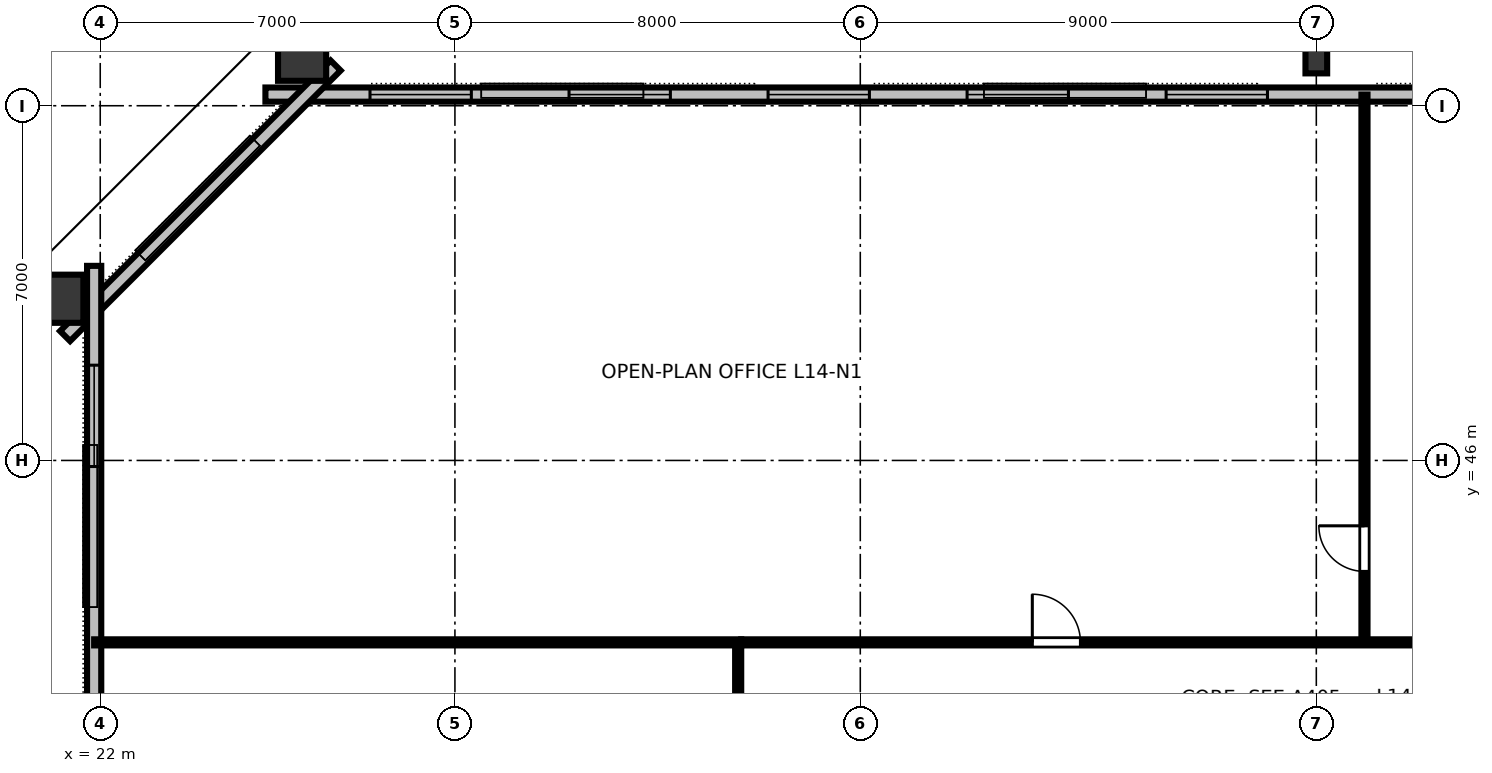
"""IFC4 building model, lengths in metres.
Left out: names, types, materials, properties, quantities, classifications, styles, units other than length and angle.
Written with IfcOpenShell. Run it as: python <this file> out.ifc"""

import sys

from ifc_helpers import new_model, si_unit, direction, frame, frame_2d, origin, origin_2d, place, context, subcontext, project, spatial, rectangle, hollow_rectangle, i_section, extrude, element, fill, save


model = new_model("IFC4")
c1 = context("Model", 3, precision=1e-05, world=origin(), true_north=direction((0.0, 1.0)))
c2 = subcontext(c1, "Body", "Model", "MODEL_VIEW")
j1 = project(units=[si_unit("LENGTHUNIT", "METRE"), si_unit("PLANEANGLEUNIT", "RADIAN")], contexts=[c1])
p1 = place(None, origin())
s1 = spatial("IfcSite", under=j1, at=p1, CompositionType="ELEMENT")
p2 = place(p1, origin())
s2 = spatial("IfcBuilding", under=s1, at=p2, CompositionType="ELEMENT")
p3 = place(p2, frame((0.0, 0.0, 56.8)))
s3 = spatial("IfcBuildingStorey", under=s2, at=p3, CompositionType="ELEMENT", Elevation=56.8)
p4 = place(p3, frame((46.0, 53.88, 0.0), z_axis=(0.0, 0.089001216718, 0.996031517284), x_axis=(-1.0, 0.0, 0.0)))
e1 = element("IfcColumn", 1, at=p4, inside=s3, PredefinedType="COLUMN", context=c2, shape_type="SweptSolid", body=[
    extrude(i_section(OverallWidth=0.428, OverallDepth=0.483, WebThickness=0.051, FlangeThickness=0.082, FilletRadius=0.025, at=origin_2d()), origin(), (0.0, 0.0, 1.0), 3.371),
])
p5 = place(p3, frame((25.984, 54.067, 0.0), z_axis=(-0.04485544424, 0.088480981137, 0.995067387215), x_axis=(-0.891933822614, -0.452165960769, 0.0)))
e2 = element("IfcColumn", 2, at=p5, inside=s3, PredefinedType="COLUMN", context=c2, shape_type="SweptSolid", body=[
    extrude(hollow_rectangle(XDim=0.95, YDim=1.15, WallThickness=0.06, at=origin_2d()), origin(), (0.0, 0.0, 1.0), 3.375),
])
p6 = place(p3, frame((21.093, 49.191, 0.0), z_axis=(-0.103150348316, 0.030287313206, 0.994204548522), x_axis=(0.953933183148, -0.280096708997, 0.107504956625)))
e3 = element("IfcColumn", 3, at=p6, inside=s3, PredefinedType="COLUMN", context=c2, shape_type="SweptSolid", body=[
    extrude(hollow_rectangle(XDim=0.95, YDim=1.15, WallThickness=0.06, at=origin_2d()), origin(), (0.0, 0.0, 1.0), 3.377),
])
p7 = place(p3, frame((66.74, 53.22, 0.0), z_axis=(0.0, 0.0, 1.0), x_axis=(-1.0, 0.0, 0.0)))
e4 = element("IfcWall", 4, at=p7, inside=s3, PredefinedType="STANDARD", context=c2, shape_type="SweptSolid", body=[
    extrude(rectangle(XDim=41.48, YDim=0.28, at=frame_2d((20.74, 0.0))), origin(), (0.0, 0.0, 1.0), 3.36),
])
p8 = place(p7, frame((2.064, 0.0, 0.8)))
e5 = element("IfcOpeningElement", 5, at=p8, cuts=e4, PredefinedType="OPENING", context=c2, shape_type="SweptSolid", body=[
    extrude(rectangle(XDim=2.0, YDim=1.95, at=frame_2d((1.0, 0.975))), frame((0.0, 0.15, 0.0), z_axis=(0.0, -1.0, 0.0), x_axis=(1.0, 0.0, 0.0)), (0.0, 0.0, 1.0), 0.3),
])
p9 = place(p7, frame((5.992, 0.0, 0.8)))
e6 = element("IfcOpeningElement", 6, at=p9, cuts=e4, PredefinedType="OPENING", context=c2, shape_type="SweptSolid", body=[
    extrude(rectangle(XDim=2.0, YDim=1.95, at=frame_2d((1.0, 0.975))), frame((0.0, 0.15, 0.0), z_axis=(0.0, -1.0, 0.0), x_axis=(1.0, 0.0, 0.0)), (0.0, 0.0, 1.0), 0.3),
])
p10 = place(p7, frame((9.92, 0.0, 0.8)))
e7 = element("IfcOpeningElement", 7, at=p10, cuts=e4, PredefinedType="OPENING", context=c2, shape_type="SweptSolid", body=[
    extrude(rectangle(XDim=2.0, YDim=1.95, at=frame_2d((1.0, 0.975))), frame((0.0, 0.15, 0.0), z_axis=(0.0, -1.0, 0.0), x_axis=(1.0, 0.0, 0.0)), (0.0, 0.0, 1.0), 0.3),
])
p11 = place(p7, frame((13.848, 0.0, 0.8)))
e8 = element("IfcOpeningElement", 8, at=p11, cuts=e4, PredefinedType="OPENING", context=c2, shape_type="SweptSolid", body=[
    extrude(rectangle(XDim=2.0, YDim=1.95, at=frame_2d((1.0, 0.975))), frame((0.0, 0.15, 0.0), z_axis=(0.0, -1.0, 0.0), x_axis=(1.0, 0.0, 0.0)), (0.0, 0.0, 1.0), 0.3),
])
p12 = place(p7, frame((21.704, 0.0, 0.8)))
e9 = element("IfcOpeningElement", 9, at=p12, cuts=e4, PredefinedType="OPENING", context=c2, shape_type="SweptSolid", body=[
    extrude(rectangle(XDim=2.0, YDim=1.95, at=frame_2d((1.0, 0.975))), frame((0.0, 0.15, 0.0), z_axis=(0.0, -1.0, 0.0), x_axis=(1.0, 0.0, 0.0)), (0.0, 0.0, 1.0), 0.3),
])
p13 = place(p7, frame((25.632, 0.0, 0.8)))
e10 = element("IfcOpeningElement", 10, at=p13, cuts=e4, PredefinedType="OPENING", context=c2, shape_type="SweptSolid", body=[
    extrude(rectangle(XDim=2.0, YDim=1.95, at=frame_2d((1.0, 0.975))), frame((0.0, 0.15, 0.0), z_axis=(0.0, -1.0, 0.0), x_axis=(1.0, 0.0, 0.0)), (0.0, 0.0, 1.0), 0.3),
])
p14 = place(p7, frame((29.56, 0.0, 0.8)))
e11 = element("IfcOpeningElement", 11, at=p14, cuts=e4, PredefinedType="OPENING", context=c2, shape_type="SweptSolid", body=[
    extrude(rectangle(XDim=2.0, YDim=1.95, at=frame_2d((1.0, 0.975))), frame((0.0, 0.15, 0.0), z_axis=(0.0, -1.0, 0.0), x_axis=(1.0, 0.0, 0.0)), (0.0, 0.0, 1.0), 0.3),
])
p15 = place(p7, frame((33.488, 0.0, 0.8)))
e12 = element("IfcOpeningElement", 12, at=p15, cuts=e4, PredefinedType="OPENING", context=c2, shape_type="SweptSolid", body=[
    extrude(rectangle(XDim=2.0, YDim=1.95, at=frame_2d((1.0, 0.975))), frame((0.0, 0.15, 0.0), z_axis=(0.0, -1.0, 0.0), x_axis=(1.0, 0.0, 0.0)), (0.0, 0.0, 1.0), 0.3),
])
p16 = place(p7, frame((37.416, 0.0, 0.8)))
e13 = element("IfcOpeningElement", 13, at=p16, cuts=e4, PredefinedType="OPENING", context=c2, shape_type="SweptSolid", body=[
    extrude(rectangle(XDim=2.0, YDim=1.95, at=frame_2d((1.0, 0.975))), frame((0.0, 0.15, 0.0), z_axis=(0.0, -1.0, 0.0), x_axis=(1.0, 0.0, 0.0)), (0.0, 0.0, 1.0), 0.3),
])
p17 = place(p3, frame((26.646, 53.794, 0.0), z_axis=(0.0, 0.0, 1.0), x_axis=(-0.707106781187, -0.707106781187, 0.0)))
e14 = element("IfcWall", 14, at=p17, inside=s3, PredefinedType="STANDARD", context=c2, shape_type="SweptSolid", body=[
    extrude(rectangle(XDim=7.551, YDim=0.28, at=frame_2d((3.775, 0.0))), origin(), (0.0, 0.0, 1.0), 3.36),
])
p18 = place(p3, frame((21.88, 49.84, 0.0), z_axis=(0.0, 0.0, 1.0), x_axis=(0.0, -1.0, 0.0)))
e15 = element("IfcWall", 15, at=p18, inside=s3, PredefinedType="STANDARD", context=c2, shape_type="SweptSolid", body=[
    extrude(rectangle(XDim=35.68, YDim=0.28, at=frame_2d((17.84, 0.0))), origin(), (0.0, 0.0, 1.0), 3.36),
])
p19 = place(p18, frame((1.96, 0.0, 0.8)))
e16 = element("IfcOpeningElement", 16, at=p19, cuts=e15, PredefinedType="OPENING", context=c2, shape_type="SweptSolid", body=[
    extrude(rectangle(XDim=2.0, YDim=1.95, at=frame_2d((1.0, 0.975))), frame((0.0, 0.15, 0.0), z_axis=(0.0, -1.0, 0.0), x_axis=(1.0, 0.0, 0.0)), (0.0, 0.0, 1.0), 0.3),
])
p20 = place(p18, frame((9.4, 0.0, 0.8)))
e17 = element("IfcOpeningElement", 17, at=p20, cuts=e15, PredefinedType="OPENING", context=c2, shape_type="SweptSolid", body=[
    extrude(rectangle(XDim=2.0, YDim=1.95, at=frame_2d((1.0, 0.975))), frame((0.0, 0.15, 0.0), z_axis=(0.0, -1.0, 0.0), x_axis=(1.0, 0.0, 0.0)), (0.0, 0.0, 1.0), 0.3),
])
p21 = place(p18, frame((13.12, 0.0, 0.8)))
e18 = element("IfcOpeningElement", 18, at=p21, cuts=e15, PredefinedType="OPENING", context=c2, shape_type="SweptSolid", body=[
    extrude(rectangle(XDim=2.0, YDim=1.95, at=frame_2d((1.0, 0.975))), frame((0.0, 0.15, 0.0), z_axis=(0.0, -1.0, 0.0), x_axis=(1.0, 0.0, 0.0)), (0.0, 0.0, 1.0), 0.3),
])
p22 = place(p18, frame((20.56, 0.0, 0.8)))
e19 = element("IfcOpeningElement", 19, at=p22, cuts=e15, PredefinedType="OPENING", context=c2, shape_type="SweptSolid", body=[
    extrude(rectangle(XDim=2.0, YDim=1.95, at=frame_2d((1.0, 0.975))), frame((0.0, 0.15, 0.0), z_axis=(0.0, -1.0, 0.0), x_axis=(1.0, 0.0, 0.0)), (0.0, 0.0, 1.0), 0.3),
])
p23 = place(p18, frame((24.28, 0.0, 0.8)))
e20 = element("IfcOpeningElement", 20, at=p23, cuts=e15, PredefinedType="OPENING", context=c2, shape_type="SweptSolid", body=[
    extrude(rectangle(XDim=2.0, YDim=1.95, at=frame_2d((1.0, 0.975))), frame((0.0, 0.15, 0.0), z_axis=(0.0, -1.0, 0.0), x_axis=(1.0, 0.0, 0.0)), (0.0, 0.0, 1.0), 0.3),
])
p24 = place(p18, frame((31.72, 0.0, 0.8)))
e21 = element("IfcOpeningElement", 21, at=p24, cuts=e15, PredefinedType="OPENING", context=c2, shape_type="SweptSolid", body=[
    extrude(rectangle(XDim=2.0, YDim=1.95, at=frame_2d((1.0, 0.975))), frame((0.0, 0.15, 0.0), z_axis=(0.0, -1.0, 0.0), x_axis=(1.0, 0.0, 0.0)), (0.0, 0.0, 1.0), 0.3),
])
p25 = place(p3, frame((46.95, 42.41, 0.0), z_axis=(0.0, 0.0, 1.0), x_axis=(0.0, 1.0, 0.0)))
e22 = element("IfcWall", 22, at=p25, inside=s3, PredefinedType="PARTITIONING", context=c2, shape_type="SweptSolid", body=[
    extrude(rectangle(XDim=10.81, YDim=0.12, at=frame_2d((5.405, 0.0))), origin(), (0.0, 0.0, 1.0), 2.64),
])
p26 = place(p25, frame((1.4, 0.0, 0.0)))
e23 = element("IfcOpeningElement", 23, at=p26, cuts=e22, PredefinedType="OPENING", context=c2, shape_type="SweptSolid", body=[
    extrude(rectangle(XDim=0.9, YDim=2.15, at=frame_2d((0.45, 1.075))), frame((0.0, 0.07, 0.0), z_axis=(0.0, -1.0, 0.0), x_axis=(1.0, 0.0, 0.0)), (0.0, 0.0, 1.0), 0.14),
])
p27 = place(p3, frame((34.65, 42.41, 0.0), z_axis=(0.0, 0.0, 1.0), x_axis=(1.0, 0.0, 0.0)))
e24 = element("IfcWall", 24, at=p27, inside=s3, PredefinedType="PARTITIONING", context=c2, shape_type="SweptSolid", body=[
    extrude(rectangle(XDim=22.7, YDim=0.12, at=frame_2d((11.35, 0.0))), origin(), (0.0, 0.0, 1.0), 2.64),
])
p28 = place(p27, frame((5.745, 0.0, 0.0)))
e25 = element("IfcOpeningElement", 25, at=p28, cuts=e24, PredefinedType="OPENING", context=c2, shape_type="SweptSolid", body=[
    extrude(rectangle(XDim=0.95, YDim=2.15, at=frame_2d((0.475, 1.075))), frame((0.0, 0.07, 0.0), z_axis=(0.0, -1.0, 0.0), x_axis=(1.0, 0.0, 0.0)), (0.0, 0.0, 1.0), 0.14),
])
p29 = place(p27, frame((16.955, 0.0, 0.0)))
e26 = element("IfcOpeningElement", 26, at=p29, cuts=e24, PredefinedType="OPENING", context=c2, shape_type="SweptSolid", body=[
    extrude(rectangle(XDim=0.95, YDim=2.15, at=frame_2d((0.475, 1.075))), frame((0.0, 0.07, 0.0), z_axis=(0.0, -1.0, 0.0), x_axis=(1.0, 0.0, 0.0)), (0.0, 0.0, 1.0), 0.14),
])
p30 = place(p3, frame((34.59, 21.65, 0.0), z_axis=(0.0, 0.0, 1.0), x_axis=(0.0, 1.0, 0.0)))
e27 = element("IfcWall", 27, at=p30, inside=s3, PredefinedType="PARTITIONING", context=c2, shape_type="SweptSolid", body=[
    extrude(rectangle(XDim=20.7, YDim=0.12, at=frame_2d((10.35, 0.0))), origin(), (0.0, 0.0, 1.0), 2.64),
])
p31 = place(p30, frame((9.875, 0.0, 0.0)))
e28 = element("IfcOpeningElement", 28, at=p31, cuts=e27, PredefinedType="OPENING", context=c2, shape_type="SweptSolid", body=[
    extrude(rectangle(XDim=0.95, YDim=2.15, at=frame_2d((0.475, 1.075))), frame((0.0, 0.07, 0.0), z_axis=(0.0, -1.0, 0.0), x_axis=(1.0, 0.0, 0.0)), (0.0, 0.0, 1.0), 0.14),
])
p32 = place(p3, frame((34.65, 42.41, 0.0), z_axis=(0.0, 0.0, 1.0), x_axis=(-1.0, 0.0, 0.0)))
e29 = element("IfcWall", 29, at=p32, inside=s3, PredefinedType="PARTITIONING", context=c2, shape_type="SweptSolid", body=[
    extrude(rectangle(XDim=12.77, YDim=0.12, at=frame_2d((6.385, 0.0))), origin(), (0.0, 0.0, 1.0), 2.64),
])
p33 = place(p12, origin())
e30 = element("IfcWindow", 30, at=p33, inside=s3, PartitioningType="SINGLE_PANEL", PredefinedType="WINDOW", context=c2, shape_type="SweptSolid", body=[
    extrude(rectangle(XDim=2.0, YDim=1.95, at=frame_2d((1.0, 0.975))), frame((0.0, 0.03, 0.0), z_axis=(0.0, -1.0, 0.0), x_axis=(1.0, 0.0, 0.0)), (0.0, 0.0, 1.0), 0.06),
])
fill(e9, e30)
p34 = place(p13, origin())
e31 = element("IfcWindow", 31, at=p34, inside=s3, PartitioningType="SINGLE_PANEL", PredefinedType="WINDOW", context=c2, shape_type="SweptSolid", body=[
    extrude(rectangle(XDim=2.0, YDim=1.95, at=frame_2d((1.0, 0.975))), frame((0.0, 0.03, 0.0), z_axis=(0.0, -1.0, 0.0), x_axis=(1.0, 0.0, 0.0)), (0.0, 0.0, 1.0), 0.06),
])
fill(e10, e31)
p35 = place(p14, origin())
e32 = element("IfcWindow", 32, at=p35, inside=s3, PartitioningType="SINGLE_PANEL", PredefinedType="WINDOW", context=c2, shape_type="SweptSolid", body=[
    extrude(rectangle(XDim=2.0, YDim=1.95, at=frame_2d((1.0, 0.975))), frame((0.0, 0.03, 0.0), z_axis=(0.0, -1.0, 0.0), x_axis=(1.0, 0.0, 0.0)), (0.0, 0.0, 1.0), 0.06),
])
fill(e11, e32)
p36 = place(p15, origin())
e33 = element("IfcWindow", 33, at=p36, inside=s3, PartitioningType="SINGLE_PANEL", PredefinedType="WINDOW", context=c2, shape_type="SweptSolid", body=[
    extrude(rectangle(XDim=2.0, YDim=1.95, at=frame_2d((1.0, 0.975))), frame((0.0, 0.03, 0.0), z_axis=(0.0, -1.0, 0.0), x_axis=(1.0, 0.0, 0.0)), (0.0, 0.0, 1.0), 0.06),
])
fill(e12, e33)
p37 = place(p16, origin())
e34 = element("IfcWindow", 34, at=p37, inside=s3, PartitioningType="SINGLE_PANEL", PredefinedType="WINDOW", context=c2, shape_type="SweptSolid", body=[
    extrude(rectangle(XDim=2.0, YDim=1.95, at=frame_2d((1.0, 0.975))), frame((0.0, 0.03, 0.0), z_axis=(0.0, -1.0, 0.0), x_axis=(1.0, 0.0, 0.0)), (0.0, 0.0, 1.0), 0.06),
])
fill(e13, e34)
p38 = place(p19, origin())
e35 = element("IfcWindow", 35, at=p38, inside=s3, PartitioningType="SINGLE_PANEL", PredefinedType="WINDOW", context=c2, shape_type="SweptSolid", body=[
    extrude(rectangle(XDim=2.0, YDim=1.95, at=frame_2d((1.0, 0.975))), frame((0.0, 0.03, 0.0), z_axis=(0.0, -1.0, 0.0), x_axis=(1.0, 0.0, 0.0)), (0.0, 0.0, 1.0), 0.06),
])
fill(e16, e35)
p39 = place(p26, origin())
e36 = element("IfcDoor", 36, at=p39, inside=s3, OperationType="SINGLE_SWING_RIGHT", PredefinedType="DOOR", context=c2, shape_type="SweptSolid", body=[
    extrude(rectangle(XDim=0.9, YDim=2.15, at=frame_2d((0.45, 1.075))), frame((0.0, 0.025, 0.0), z_axis=(0.0, -1.0, 0.0), x_axis=(1.0, 0.0, 0.0)), (0.0, 0.0, 1.0), 0.05),
])
fill(e23, e36)
p40 = place(p28, origin())
e37 = element("IfcDoor", 37, at=p40, inside=s3, OperationType="SINGLE_SWING_LEFT", PredefinedType="DOOR", context=c2, shape_type="SweptSolid", body=[
    extrude(rectangle(XDim=0.95, YDim=2.15, at=frame_2d((0.475, 1.075))), frame((0.0, 0.025, 0.0), z_axis=(0.0, -1.0, 0.0), x_axis=(1.0, 0.0, 0.0)), (0.0, 0.0, 1.0), 0.05),
])
fill(e25, e37)
save(model, sys.argv[1])
